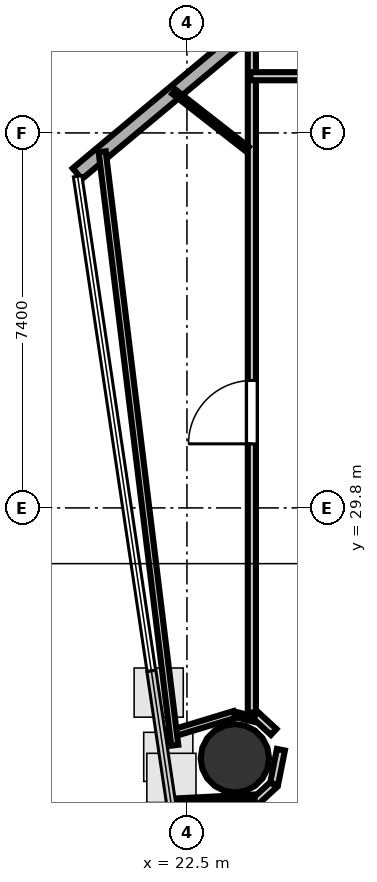
"""IFC4 building model, lengths in metres.
Left out: names, types, materials, properties, quantities, classifications, styles, units other than length and angle.
Written with IfcOpenShell. Run it as: python <this file> out.ifc"""

import sys

from ifc_helpers import new_model, si_unit, direction, frame, frame_2d, origin, origin_2d, place, context, subcontext, project, spatial, rectangle, hollow_circle, extrude, element, fill, save


model = new_model("IFC4")
c1 = context("Model", 3, precision=1e-05, world=origin(), true_north=direction((0.0, 1.0)))
c2 = subcontext(c1, "Body", "Model", "MODEL_VIEW")
j1 = project(units=[si_unit("LENGTHUNIT", "METRE"), si_unit("PLANEANGLEUNIT", "RADIAN")], contexts=[c1])
p1 = place(None, origin())
s1 = spatial("IfcSite", under=j1, at=p1, CompositionType="ELEMENT")
p2 = place(p1, origin())
s2 = spatial("IfcBuilding", under=s1, at=p2, CompositionType="ELEMENT")
p3 = place(p2, frame((0.0, 0.0, 180.9)))
s3 = spatial("IfcBuildingStorey", under=s2, at=p3, CompositionType="ELEMENT", Elevation=180.9)
p4 = place(p3, frame((23.446, 24.859, 0.0), z_axis=(0.0, 0.0, 1.0), x_axis=(1.0, 0.0, 0.0)))
e1 = element("IfcColumn", 1, at=p4, inside=s3, PredefinedType="COLUMN", context=c2, shape_type="SweptSolid", body=[
    extrude(hollow_circle(Radius=0.675, WallThickness=0.032, at=origin_2d()), origin(), (0.0, 0.0, 1.0), 3.7),
])
p5 = place(p3, frame((26.522, 41.562, 0.0), z_axis=(0.0, 0.0, 1.0), x_axis=(-0.767540623089, -0.6410003057, 0.0)))
e2 = element("IfcWall", 2, at=p5, inside=s3, PredefinedType="SOLIDWALL", context=c2, shape_type="SweptSolid", body=[
    extrude(rectangle(XDim=8.061, YDim=0.28, at=frame_2d((4.03, 0.0))), origin(), (0.0, 0.0, 1.0), 3.4),
])
p6 = place(p5, frame((1.668, 0.0, 0.85)))
e3 = element("IfcOpeningElement", 3, at=p6, cuts=e2, PredefinedType="OPENING", context=c2, shape_type="SweptSolid", body=[
    extrude(rectangle(XDim=1.5, YDim=2.1, at=frame_2d((0.75, 1.05))), frame((0.0, 0.15, 0.0), z_axis=(0.0, -1.0, 0.0), x_axis=(1.0, 0.0, 0.0)), (0.0, 0.0, 1.0), 0.3),
])
p7 = place(p3, frame((24.211, 25.379, 0.0), z_axis=(0.0, 0.0, 1.0), x_axis=(-0.735475561179, 0.677551251868, 0.0)))
e4 = element("IfcWall", 4, at=p7, inside=s3, PredefinedType="PARTITIONING", context=c2, shape_type="SweptSolid", body=[
    extrude(rectangle(XDim=0.598, YDim=0.16, at=frame_2d((0.299, 0.0))), origin(), (0.0, 0.0, 1.0), 2.72),
])
p8 = place(p3, frame((23.781, 25.762, 0.0), z_axis=(0.0, 0.0, 1.0), x_axis=(0.0, 1.0, 0.0)))
e5 = element("IfcWall", 5, at=p8, inside=s3, PredefinedType="PARTITIONING", context=c2, shape_type="SweptSolid", body=[
    extrude(rectangle(XDim=13.531, YDim=0.16, at=frame_2d((6.766, 0.0))), origin(), (0.0, 0.0, 1.0), 2.72),
])
p9 = place(p8, frame((5.302, 0.0, 0.0)))
e6 = element("IfcOpeningElement", 6, at=p9, cuts=e5, PredefinedType="OPENING", context=c2, shape_type="SweptSolid", body=[
    extrude(rectangle(XDim=1.25, YDim=2.2, at=frame_2d((0.625, 1.1))), frame((0.0, 0.09, 0.0), z_axis=(0.0, -1.0, 0.0), x_axis=(1.0, 0.0, 0.0)), (0.0, 0.0, 1.0), 0.18),
])
p10 = place(p3, frame((23.75, 38.319, 0.0), z_axis=(0.0, 0.0, 1.0), x_axis=(1.0, 0.0, 0.0)))
e7 = element("IfcWall", 7, at=p10, inside=s3, PredefinedType="PARTITIONING", context=c2, shape_type="SweptSolid", body=[
    extrude(rectangle(XDim=12.165, YDim=0.16, at=frame_2d((6.083, 0.0))), origin(), (0.0, 0.0, 1.0), 2.72),
])
p11 = place(p10, frame((5.458, 0.0, 0.0)))
e8 = element("IfcOpeningElement", 8, at=p11, cuts=e7, PredefinedType="OPENING", context=c2, shape_type="SweptSolid", body=[
    extrude(rectangle(XDim=1.25, YDim=2.2, at=frame_2d((0.625, 1.1))), frame((0.0, 0.09, 0.0), z_axis=(0.0, -1.0, 0.0), x_axis=(1.0, 0.0, 0.0)), (0.0, 0.0, 1.0), 0.18),
])
p12 = place(p3, frame((23.771, 23.934, 0.0), z_axis=(0.0, 0.0, 1.0), x_axis=(0.735475561179, 0.677551251868, 0.0)))
e9 = element("IfcWall", 9, at=p12, inside=s3, PredefinedType="PARTITIONING", context=c2, shape_type="SweptSolid", body=[
    extrude(rectangle(XDim=0.598, YDim=0.16, at=frame_2d((0.299, 0.0))), origin(), (0.0, 0.0, 1.0), 2.72),
])
p13 = place(p3, frame((24.221, 24.356, 0.0), z_axis=(0.0, 0.0, 1.0), x_axis=(0.19495084259, 0.980813014276, 0.0)))
e10 = element("IfcWall", 10, at=p13, inside=s3, PredefinedType="PARTITIONING", context=c2, shape_type="SweptSolid", body=[
    extrude(rectangle(XDim=0.685, YDim=0.16, at=frame_2d((0.343, 0.0))), origin(), (0.0, 0.0, 1.0), 2.72),
])
p14 = place(p3, frame((23.689, 36.883, 0.0), z_axis=(0.0, 0.0, 1.0), x_axis=(-0.788004213501, 0.615669846188, 0.0)))
e11 = element("IfcWall", 11, at=p14, inside=s3, PredefinedType="PARTITIONING", context=c2, shape_type="SweptSolid", body=[
    extrude(rectangle(XDim=1.836, YDim=0.105, at=frame_2d((0.918, 0.0))), origin(), (0.0, 0.0, 1.0), 2.72),
])
p15 = place(p3, frame((23.827, 25.632, 0.0), z_axis=(0.0, 0.0, 1.0), x_axis=(-0.970774083864, 0.239995162656, 0.0)))
e12 = element("IfcWall", 12, at=p15, inside=s3, PredefinedType="PARTITIONING", context=c2, shape_type="SweptSolid", body=[
    extrude(rectangle(XDim=0.385, YDim=0.105, at=frame_2d((0.192, 0.0))), origin(), (0.0, 0.0, 1.0), 2.72),
])
p16 = place(p3, frame((23.437, 25.724, 0.0), z_axis=(0.0, 0.0, 1.0), x_axis=(-0.956913021146, -0.290374706133, 0.0)))
e13 = element("IfcWall", 13, at=p16, inside=s3, PredefinedType="PARTITIONING", context=c2, shape_type="SweptSolid", body=[
    extrude(rectangle(XDim=1.531, YDim=0.14, at=frame_2d((0.766, 0.0))), origin(), (0.0, 0.0, 1.0), 2.72),
])
p17 = place(p3, frame((22.161, 24.008, 0.0), z_axis=(0.0, 0.0, 1.0), x_axis=(0.998741040338, 0.050163077511, 0.0)))
e14 = element("IfcWall", 14, at=p17, inside=s3, PredefinedType="PARTITIONING", context=c2, shape_type="SweptSolid", body=[
    extrude(rectangle(XDim=1.674, YDim=0.105, at=frame_2d((0.837, 0.0))), origin(), (0.0, 0.0, 1.0), 2.72),
])
p18 = place(p3, frame((22.259, 25.117, 0.0), z_axis=(0.0, 0.0, 1.0), x_axis=(-0.121339817711, 0.992611025849, 0.0)))
e15 = element("IfcWall", 15, at=p18, inside=s3, PredefinedType="PARTITIONING", context=c2, shape_type="SweptSolid", body=[
    extrude(rectangle(XDim=11.799, YDim=0.14, at=frame_2d((5.899, 0.0))), origin(), (0.0, 0.0, 1.0), 2.72),
])
p19 = place(p9, origin())
e16 = element("IfcDoor", 16, at=p19, inside=s3, OperationType="SINGLE_SWING_LEFT", PredefinedType="DOOR", context=c2, shape_type="SweptSolid", body=[
    extrude(rectangle(XDim=1.25, YDim=2.2, at=frame_2d((0.625, 1.1))), frame((0.0, 0.025, 0.0), z_axis=(0.0, -1.0, 0.0), x_axis=(1.0, 0.0, 0.0)), (0.0, 0.0, 1.0), 0.05),
])
fill(e6, e16)
save(model, sys.argv[1])
